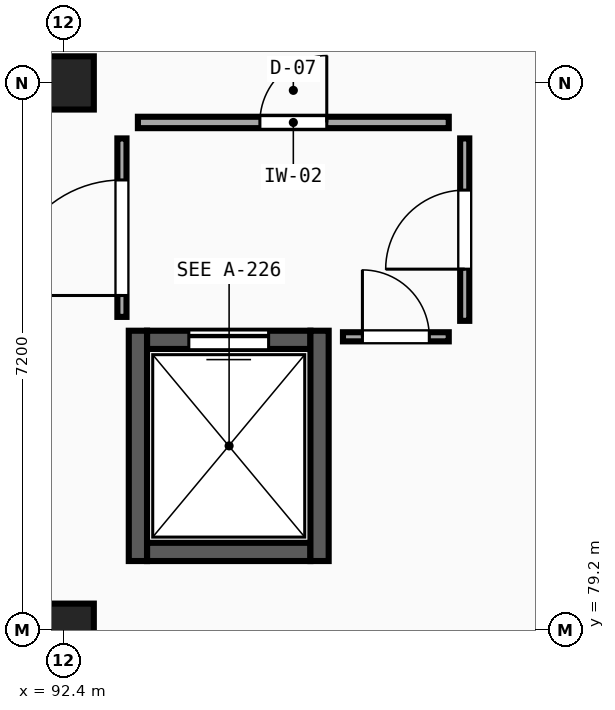
"""IFC4 building model, lengths in metres.
Left out: names, types, materials, properties, quantities, classifications, styles, units other than length and angle.
Written with IfcOpenShell. Run it as: python <this file> out.ifc"""

import sys

from ifc_helpers import new_model, si_unit, direction, frame, frame_2d, origin, origin_2d, place, context, subcontext, project, spatial, rectangle, extrude, element, fill, save


model = new_model("IFC4")
c1 = context("Model", 3, precision=1e-05, world=origin(), true_north=direction((0.0, 1.0)))
c2 = subcontext(c1, "Body", "Model", "MODEL_VIEW")
j1 = project(units=[si_unit("LENGTHUNIT", "METRE"), si_unit("PLANEANGLEUNIT", "RADIAN")], contexts=[c1])
p1 = place(None, origin())
s1 = spatial("IfcSite", under=j1, at=p1, CompositionType="ELEMENT")
p2 = place(p1, origin())
s2 = spatial("IfcBuilding", under=s1, at=p2, CompositionType="ELEMENT")
p3 = place(p2, frame((0.0, 0.0, -5.4)))
s3 = spatial("IfcBuildingStorey", under=s2, at=p3, CompositionType="ELEMENT", Elevation=-5.4)
for number, where, z_axis, x_axis in (
    (1, (92.4, 79.2, 0.0), (0.0, 0.0, 1.0), (1.0, 0.0, 0.0)),
    (2, (92.4, 86.4, 0.0), (0.0, 0.0, 1.0), (1.0, 0.0, 0.0)),
):
    element("IfcColumn", number, at=place(p3, frame(where, z_axis=z_axis, x_axis=x_axis)), inside=s3, PredefinedType="COLUMN", context=c2, shape_type="SweptSolid", body=[
        extrude(rectangle(XDim=0.8, YDim=0.7, at=origin_2d()), origin(), (0.0, 0.0, 1.0), 5.4),
    ])
p4 = place(p3, frame((95.65, 83.02, 0.0), z_axis=(0.0, 0.0, 1.0), x_axis=(-1.0, 0.0, 0.0)))
e3 = element("IfcWall", 3, at=p4, inside=s3, PredefinedType="SHEAR", context=c2, shape_type="SweptSolid", body=[
    extrude(rectangle(XDim=2.15, YDim=0.24, at=frame_2d((1.075, 0.0))), origin(), (0.0, 0.0, 1.0), 5.05),
])
p5 = place(p4, frame((0.55, 0.0, 0.0)))
e4 = element("IfcOpeningElement", 4, at=p5, cuts=e3, PredefinedType="OPENING", context=c2, shape_type="SweptSolid", body=[
    extrude(rectangle(XDim=1.05, YDim=2.2, at=frame_2d((0.525, 1.1))), frame((0.0, 0.14, 0.0), z_axis=(0.0, -1.0, 0.0), x_axis=(1.0, 0.0, 0.0)), (0.0, 0.0, 1.0), 0.28),
])
p6 = place(p3, frame((93.5, 80.23, 0.0), z_axis=(0.0, 0.0, 1.0), x_axis=(1.0, 0.0, 0.0)))
e5 = element("IfcWall", 5, at=p6, inside=s3, PredefinedType="SHEAR", context=c2, shape_type="SweptSolid", body=[
    extrude(rectangle(XDim=2.15, YDim=0.24, at=frame_2d((1.075, 0.0))), origin(), (0.0, 0.0, 1.0), 5.05),
])
for number, where, z_axis, x_axis in (
    (6, (93.38, 83.14, 0.0), (0.0, 0.0, 1.0), (0.0, -1.0, 0.0)),
    (7, (95.77, 80.11, 0.0), (0.0, 0.0, 1.0), (0.0, 1.0, 0.0)),
):
    element("IfcWall", number, at=place(p3, frame(where, z_axis=z_axis, x_axis=x_axis)), inside=s3, PredefinedType="SHEAR", context=c2, shape_type="SweptSolid", body=[
        extrude(rectangle(XDim=3.03, YDim=0.24, at=frame_2d((1.515, 0.0))), origin(), (0.0, 0.0, 1.0), 5.05),
    ])
p7 = place(p3, frame((93.38, 85.88, 0.0), z_axis=(0.0, 0.0, 1.0), x_axis=(1.0, 0.0, 0.0)))
e8 = element("IfcWall", 8, at=p7, inside=s3, PredefinedType="PARTITIONING", context=c2, shape_type="SweptSolid", body=[
    extrude(rectangle(XDim=4.09, YDim=0.15, at=frame_2d((2.045, 0.0))), origin(), (0.0, 0.0, 1.0), 4.55),
])
p8 = place(p7, frame((1.605, 0.0, 0.0)))
e9 = element("IfcOpeningElement", 9, at=p8, cuts=e8, PredefinedType="OPENING", context=c2, shape_type="SweptSolid", body=[
    extrude(rectangle(XDim=0.88, YDim=2.13, at=frame_2d((0.44, 1.065))), frame((0.0, 0.095, 0.0), z_axis=(0.0, -1.0, 0.0), x_axis=(1.0, 0.0, 0.0)), (0.0, 0.0, 1.0), 0.19),
])
p9 = place(p3, frame((97.68, 83.27, 0.0), z_axis=(0.0, 0.0, 1.0), x_axis=(0.0, 1.0, 0.0)))
e10 = element("IfcWall", 10, at=p9, inside=s3, PredefinedType="PARTITIONING", context=c2, shape_type="SweptSolid", body=[
    extrude(rectangle(XDim=2.4, YDim=0.12, at=frame_2d((1.2, 0.0))), origin(), (0.0, 0.0, 1.0), 5.05),
])
p10 = place(p9, frame((0.68, 0.0, 0.0)))
e11 = element("IfcOpeningElement", 11, at=p10, cuts=e10, PredefinedType="OPENING", context=c2, shape_type="SweptSolid", body=[
    extrude(rectangle(XDim=1.04, YDim=2.29, at=frame_2d((0.52, 1.145))), frame((0.0, 0.08, 0.0), z_axis=(0.0, -1.0, 0.0), x_axis=(1.0, 0.0, 0.0)), (0.0, 0.0, 1.0), 0.16),
])
p11 = place(p3, frame((93.17, 83.322, 0.0), z_axis=(0.0, 0.0, 1.0), x_axis=(0.0, 1.0, 0.0)))
e12 = element("IfcWall", 12, at=p11, inside=s3, PredefinedType="PARTITIONING", context=c2, shape_type="SweptSolid", body=[
    extrude(rectangle(XDim=2.348, YDim=0.12, at=frame_2d((1.174, 0.0))), origin(), (0.0, 0.0, 1.0), 5.05),
])
p12 = place(p11, frame((0.281, 0.0, 0.0)))
e13 = element("IfcOpeningElement", 13, at=p12, cuts=e12, PredefinedType="OPENING", context=c2, shape_type="SweptSolid", body=[
    extrude(rectangle(XDim=1.52, YDim=2.29, at=frame_2d((0.76, 1.145))), frame((0.0, 0.08, 0.0), z_axis=(0.0, -1.0, 0.0), x_axis=(1.0, 0.0, 0.0)), (0.0, 0.0, 1.0), 0.16),
])
p13 = place(p3, frame((96.078, 83.06, 0.0), z_axis=(0.0, 0.0, 1.0), x_axis=(1.0, 0.0, 0.0)))
e14 = element("IfcWall", 14, at=p13, inside=s3, PredefinedType="PARTITIONING", context=c2, shape_type="SweptSolid", body=[
    extrude(rectangle(XDim=1.392, YDim=0.12, at=frame_2d((0.696, 0.0))), origin(), (0.0, 0.0, 1.0), 5.05),
])
p14 = place(p13, frame((0.256, 0.0, 0.0)))
e15 = element("IfcOpeningElement", 15, at=p14, cuts=e14, PredefinedType="OPENING", context=c2, shape_type="SweptSolid", body=[
    extrude(rectangle(XDim=0.88, YDim=2.05, at=frame_2d((0.44, 1.025))), frame((0.0, 0.08, 0.0), z_axis=(0.0, -1.0, 0.0), x_axis=(1.0, 0.0, 0.0)), (0.0, 0.0, 1.0), 0.16),
])
p15 = place(p5, origin())
e16 = element("IfcDoor", 16, at=p15, inside=s3, OperationType="SLIDING_TO_RIGHT", PredefinedType="DOOR", context=c2, shape_type="SweptSolid", body=[
    extrude(rectangle(XDim=1.05, YDim=2.2, at=frame_2d((0.525, 1.1))), frame((0.0, 0.025, 0.0), z_axis=(0.0, -1.0, 0.0), x_axis=(1.0, 0.0, 0.0)), (0.0, 0.0, 1.0), 0.05),
])
fill(e4, e16)
p16 = place(p8, origin())
e17 = element("IfcDoor", 17, at=p16, inside=s3, OperationType="SINGLE_SWING_RIGHT", PredefinedType="DOOR", context=c2, shape_type="SweptSolid", body=[
    extrude(rectangle(XDim=0.88, YDim=2.13, at=frame_2d((0.44, 1.065))), frame((0.0, 0.025, 0.0), z_axis=(0.0, -1.0, 0.0), x_axis=(1.0, 0.0, 0.0)), (0.0, 0.0, 1.0), 0.05),
])
fill(e9, e17)
p17 = place(p10, origin())
e18 = element("IfcDoor", 18, at=p17, inside=s3, OperationType="SINGLE_SWING_LEFT", PredefinedType="DOOR", context=c2, shape_type="SweptSolid", body=[
    extrude(rectangle(XDim=1.04, YDim=2.29, at=frame_2d((0.52, 1.145))), frame((0.0, 0.025, 0.0), z_axis=(0.0, -1.0, 0.0), x_axis=(1.0, 0.0, 0.0)), (0.0, 0.0, 1.0), 0.05),
])
fill(e11, e18)
p18 = place(p12, origin())
e19 = element("IfcDoor", 19, at=p18, inside=s3, OperationType="SINGLE_SWING_LEFT", PredefinedType="DOOR", context=c2, shape_type="SweptSolid", body=[
    extrude(rectangle(XDim=1.52, YDim=2.29, at=frame_2d((0.76, 1.145))), frame((0.0, 0.025, 0.0), z_axis=(0.0, -1.0, 0.0), x_axis=(1.0, 0.0, 0.0)), (0.0, 0.0, 1.0), 0.05),
])
fill(e13, e19)
p19 = place(p14, origin())
e20 = element("IfcDoor", 20, at=p19, inside=s3, OperationType="SINGLE_SWING_LEFT", PredefinedType="DOOR", context=c2, shape_type="SweptSolid", body=[
    extrude(rectangle(XDim=0.88, YDim=2.05, at=frame_2d((0.44, 1.025))), frame((0.0, 0.025, 0.0), z_axis=(0.0, -1.0, 0.0), x_axis=(1.0, 0.0, 0.0)), (0.0, 0.0, 1.0), 0.05),
])
fill(e15, e20)
save(model, sys.argv[1])
